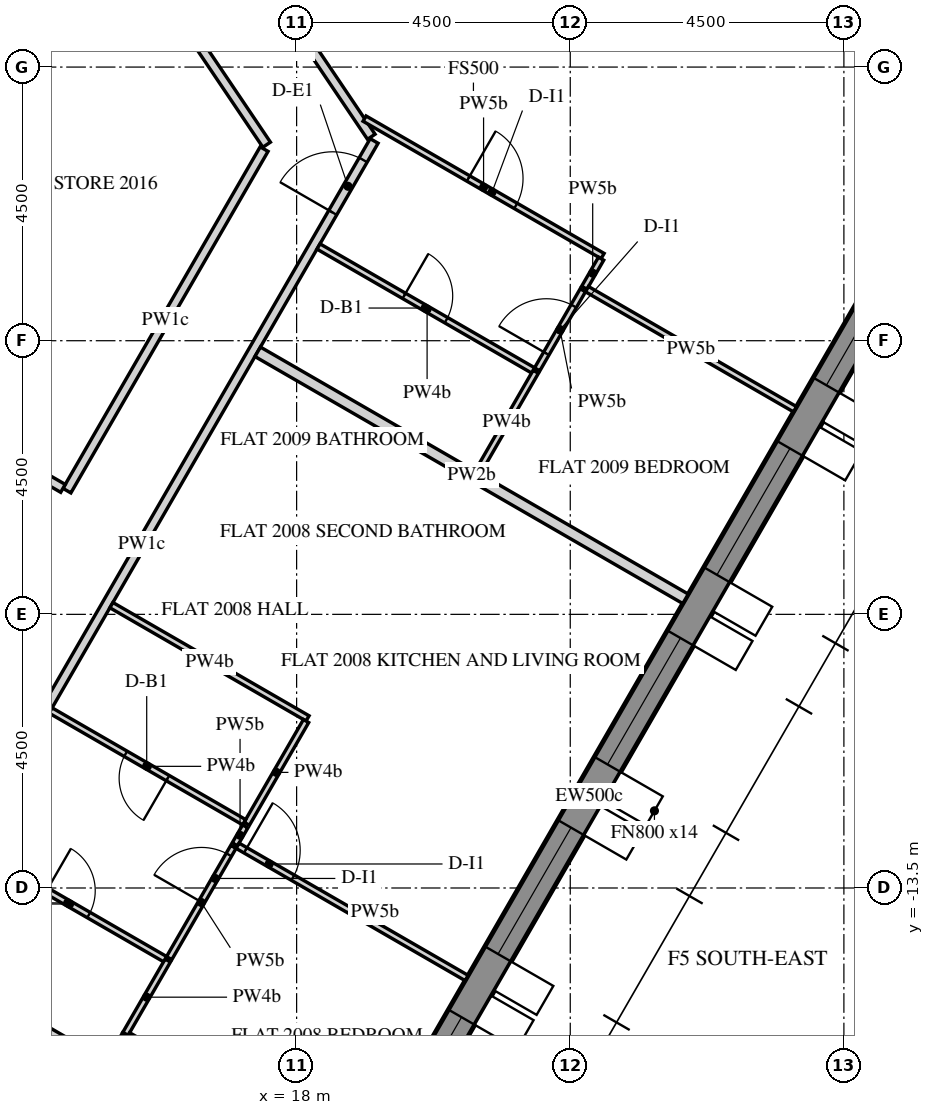
"""IFC4 building model, lengths in metres.
Left out: names, types, materials, properties, quantities, classifications, styles, units other than length and angle.
Written with IfcOpenShell. Run it as: python <this file> out.ifc"""

import sys

from ifc_helpers import new_model, si_unit, direction, frame, frame_2d, origin, place, context, subcontext, project, spatial, polyline, rectangle, outline, extrude, element, fill, save


model = new_model("IFC4")
c1 = context("Model", 3, precision=1e-05, world=origin(), true_north=direction((0.0, 1.0)))
c2 = subcontext(c1, "Body", "Model", "MODEL_VIEW")
j1 = project(units=[si_unit("LENGTHUNIT", "METRE"), si_unit("PLANEANGLEUNIT", "RADIAN")], contexts=[c1])
p1 = place(None, origin())
s1 = spatial("IfcSite", under=j1, at=p1, CompositionType="ELEMENT")
p2 = place(p1, origin())
s2 = spatial("IfcBuilding", under=s1, at=p2, CompositionType="ELEMENT")
p3 = place(p2, frame((0.0, 0.0, 256.2)))
s3 = spatial("IfcBuildingStorey", under=s2, at=p3, CompositionType="ELEMENT", Elevation=256.2)
p4 = place(p3, frame((16.451, -23.005, 0.0), z_axis=(0.0, 0.0, 1.0), x_axis=(0.500003737743, 0.866023245787, 0.0)))
e1 = element("IfcWall", 1, at=p4, inside=s3, PredefinedType="SOLIDWALL", context=c2, shape_type="SweptSolid", body=[
    extrude(outline(polyline([(-0.021, -0.25), (25.468, -0.25), (25.421, 0.25), (0.021, 0.25), (-0.021, -0.25)])), origin(), (0.0, 0.0, 1.0), 3.75),
])
p5 = place(p4, frame((2.522, 0.0, 0.6)))
e2 = element("IfcOpeningElement", 2, at=p5, cuts=e1, PredefinedType="OPENING", context=c2, shape_type="SweptSolid", body=[
    extrude(rectangle(XDim=2.4, YDim=2.7, at=frame_2d((1.2, 1.35))), frame((0.0, 0.26, 0.0), z_axis=(0.0, -1.0, 0.0), x_axis=(1.0, 0.0, 0.0)), (0.0, 0.0, 1.0), 0.52),
])
p6 = place(p4, frame((6.122, 0.0, 0.6)))
e3 = element("IfcOpeningElement", 3, at=p6, cuts=e1, PredefinedType="OPENING", context=c2, shape_type="SweptSolid", body=[
    extrude(rectangle(XDim=2.4, YDim=2.7, at=frame_2d((1.2, 1.35))), frame((0.0, 0.26, 0.0), z_axis=(0.0, -1.0, 0.0), x_axis=(1.0, 0.0, 0.0)), (0.0, 0.0, 1.0), 0.52),
])
p7 = place(p4, frame((9.722, 0.0, 0.6)))
e4 = element("IfcOpeningElement", 4, at=p7, cuts=e1, PredefinedType="OPENING", context=c2, shape_type="SweptSolid", body=[
    extrude(rectangle(XDim=2.4, YDim=2.7, at=frame_2d((1.2, 1.35))), frame((0.0, 0.26, 0.0), z_axis=(0.0, -1.0, 0.0), x_axis=(1.0, 0.0, 0.0)), (0.0, 0.0, 1.0), 0.52),
])
p8 = place(p4, frame((13.323, 0.0, 0.6)))
e5 = element("IfcOpeningElement", 5, at=p8, cuts=e1, PredefinedType="OPENING", context=c2, shape_type="SweptSolid", body=[
    extrude(rectangle(XDim=2.4, YDim=2.7, at=frame_2d((1.2, 1.35))), frame((0.0, 0.26, 0.0), z_axis=(0.0, -1.0, 0.0), x_axis=(1.0, 0.0, 0.0)), (0.0, 0.0, 1.0), 0.52),
])
p9 = place(p4, frame((16.922, 0.0, 0.6)))
e6 = element("IfcOpeningElement", 6, at=p9, cuts=e1, PredefinedType="OPENING", context=c2, shape_type="SweptSolid", body=[
    extrude(rectangle(XDim=2.4, YDim=2.7, at=frame_2d((1.2, 1.35))), frame((0.0, 0.26, 0.0), z_axis=(0.0, -1.0, 0.0), x_axis=(1.0, 0.0, 0.0)), (0.0, 0.0, 1.0), 0.52),
])
p10 = place(p4, frame((20.522, 0.0, 0.6)))
e7 = element("IfcOpeningElement", 7, at=p10, cuts=e1, PredefinedType="OPENING", context=c2, shape_type="SweptSolid", body=[
    extrude(rectangle(XDim=2.4, YDim=2.7, at=frame_2d((1.2, 1.35))), frame((0.0, 0.26, 0.0), z_axis=(0.0, -1.0, 0.0), x_axis=(1.0, 0.0, 0.0)), (0.0, 0.0, 1.0), 0.52),
])
p11 = place(p3, frame((6.351, -11.0, 0.0), z_axis=(0.0, 0.0, 1.0), x_axis=(0.499998894578, -0.866026041999, 0.0)))
e8 = element("IfcWall", 8, at=p11, inside=s3, PredefinedType="SHEAR", context=c2, shape_type="SweptSolid", body=[
    extrude(rectangle(XDim=15.544, YDim=0.4, at=frame_2d((7.772, 0.0))), origin(), (0.0, 0.0, 1.0), 3.75),
])
p12 = place(p11, frame((6.872, 0.0, 0.0)))
e9 = element("IfcOpeningElement", 9, at=p12, cuts=e8, PredefinedType="OPENING", context=c2, shape_type="SweptSolid", body=[
    extrude(rectangle(XDim=1.8, YDim=2.4, at=frame_2d((0.9, 1.2))), frame((0.0, 0.21, 0.0), z_axis=(0.0, -1.0, 0.0), x_axis=(1.0, 0.0, 0.0)), (0.0, 0.0, 1.0), 0.42),
])
p13 = place(p3, frame((11.627, -14.462, 0.0), z_axis=(0.0, 0.0, 1.0), x_axis=(0.499994634027, 0.866028501808, 0.0)))
e10 = element("IfcWall", 10, at=p13, inside=s3, PredefinedType="PARTITIONING", context=c2, shape_type="SweptSolid", body=[
    extrude(rectangle(XDim=15.296, YDim=0.15, at=frame_2d((7.648, 0.0))), origin(), (0.0, 0.0, 1.0), 2.823),
])
p14 = place(p13, frame((2.725, 0.0, 0.0)))
e11 = element("IfcOpeningElement", 11, at=p14, cuts=e10, PredefinedType="OPENING", context=c2, shape_type="SweptSolid", body=[
    extrude(rectangle(XDim=1.0, YDim=2.1, at=frame_2d((0.5, 1.05))), frame((0.0, 0.085, 0.0), z_axis=(0.0, -1.0, 0.0), x_axis=(1.0, 0.0, 0.0)), (0.0, 0.0, 1.0), 0.17),
])
p15 = place(p13, frame((13.936, 0.0, 0.0)))
e12 = element("IfcOpeningElement", 12, at=p15, cuts=e10, PredefinedType="OPENING", context=c2, shape_type="SweptSolid", body=[
    extrude(rectangle(XDim=1.0, YDim=2.1, at=frame_2d((0.5, 1.05))), frame((0.0, 0.085, 0.0), z_axis=(0.0, -1.0, 0.0), x_axis=(1.0, 0.0, 0.0)), (0.0, 0.0, 1.0), 0.17),
])
p16 = place(p3, frame((14.88, -16.427, 0.0), z_axis=(0.0, 0.0, 1.0), x_axis=(-0.86601654697, 0.500015340139, 0.0)))
e13 = element("IfcWall", 13, at=p16, inside=s3, PredefinedType="PARTITIONING", context=c2, shape_type="SweptSolid", body=[
    extrude(rectangle(XDim=3.8, YDim=0.15, at=frame_2d((1.9, 0.0))), origin(), (0.0, 0.0, 1.0), 2.823),
])
p17 = place(p3, frame((19.228, -1.146, 0.0), z_axis=(0.0, 0.0, 1.0), x_axis=(-0.559190017735, 0.829039519001, 0.0)))
e14 = element("IfcWall", 14, at=p17, inside=s3, PredefinedType="PARTITIONING", context=c2, shape_type="SweptSolid", body=[
    extrude(rectangle(XDim=17.273, YDim=0.15, at=frame_2d((8.637, 0.0))), origin(), (0.0, 0.0, 1.0), 2.823),
])
p18 = place(p17, frame((6.478, 0.0, 0.0)))
e15 = element("IfcOpeningElement", 15, at=p18, cuts=e14, PredefinedType="OPENING", context=c2, shape_type="SweptSolid", body=[
    extrude(rectangle(XDim=1.0, YDim=2.1, at=frame_2d((0.5, 1.05))), frame((0.0, 0.085, 0.0), z_axis=(0.0, -1.0, 0.0), x_axis=(1.0, 0.0, 0.0)), (0.0, 0.0, 1.0), 0.17),
])
p19 = place(p3, frame((12.627, 5.958, 0.0), z_axis=(0.0, 0.0, 1.0), x_axis=(0.559185493191, -0.829042570804, 0.0)))
e16 = element("IfcWall", 16, at=p19, inside=s3, PredefinedType="PARTITIONING", context=c2, shape_type="SweptSolid", body=[
    extrude(rectangle(XDim=8.727, YDim=0.15, at=frame_2d((4.363, 0.0))), origin(), (0.0, 0.0, 1.0), 2.823),
])
p20 = place(p19, frame((3.913, 0.0, 0.0)))
e17 = element("IfcOpeningElement", 17, at=p20, cuts=e16, PredefinedType="OPENING", context=c2, shape_type="SweptSolid", body=[
    extrude(rectangle(XDim=0.9, YDim=2.1, at=frame_2d((0.45, 1.05))), frame((0.0, 0.085, 0.0), z_axis=(0.0, -1.0, 0.0), x_axis=(1.0, 0.0, 0.0)), (0.0, 0.0, 1.0), 0.17),
])
p21 = place(p3, frame((17.465, -1.349, 0.0), z_axis=(0.0, 0.0, 1.0), x_axis=(-0.500001610943, -0.866024473704, 0.0)))
e18 = element("IfcWall", 18, at=p21, inside=s3, PredefinedType="PARTITIONING", context=c2, shape_type="SweptSolid", body=[
    extrude(rectangle(XDim=6.485, YDim=0.15, at=frame_2d((3.243, 0.0))), origin(), (0.0, 0.0, 1.0), 2.823),
])
p22 = place(p3, frame((14.158, -6.928, 0.0), z_axis=(0.0, 0.0, 1.0), x_axis=(-0.866024684746, 0.500001245408, 0.0)))
e19 = element("IfcWall", 19, at=p22, inside=s3, PredefinedType="PARTITIONING", context=c2, shape_type="SweptSolid", body=[
    extrude(rectangle(XDim=4.725, YDim=0.15, at=frame_2d((2.363, 0.0))), origin(), (0.0, 0.0, 1.0), 2.823),
])
p23 = place(p3, frame((17.155, -12.487, 0.0), z_axis=(0.0, 0.0, 1.0), x_axis=(-0.499681137129, -0.866209421097, 0.0)))
e20 = element("IfcWall", 20, at=p23, inside=s3, PredefinedType="PARTITIONING", context=c2, shape_type="SweptSolid", body=[
    extrude(rectangle(XDim=0.341, YDim=0.1, at=frame_2d((0.17, 0.0))), origin(), (0.0, 0.0, 1.0), 2.823),
])
p24 = place(p3, frame((17.029, -12.805, 0.0), z_axis=(0.0, 0.0, 1.0), x_axis=(0.866027639635, -0.499996127374, 0.0)))
e21 = element("IfcWall", 21, at=p24, inside=s3, PredefinedType="PARTITIONING", context=c2, shape_type="SweptSolid", body=[
    extrude(rectangle(XDim=4.35, YDim=0.1, at=frame_2d((2.175, 0.0))), origin(), (0.0, 0.0, 1.0), 2.823),
])
p25 = place(p24, frame((0.15, 0.0, 0.0)))
e22 = element("IfcOpeningElement", 22, at=p25, cuts=e21, PredefinedType="OPENING", context=c2, shape_type="SweptSolid", body=[
    extrude(rectangle(XDim=0.9, YDim=2.1, at=frame_2d((0.45, 1.05))), frame((0.0, 0.06, 0.0), z_axis=(0.0, -1.0, 0.0), x_axis=(1.0, 0.0, 0.0)), (0.0, 0.0, 1.0), 0.12),
])
p26 = place(p3, frame((14.954, -8.849, 0.0), z_axis=(0.0, 0.0, 1.0), x_axis=(0.866028424924, -0.499994767197, 0.0)))
e23 = element("IfcWall", 23, at=p26, inside=s3, PredefinedType="PARTITIONING", context=c2, shape_type="SweptSolid", body=[
    extrude(rectangle(XDim=3.725, YDim=0.1, at=frame_2d((1.863, 0.0))), origin(), (0.0, 0.0, 1.0), 2.823),
])
p27 = place(p3, frame((18.155, -10.754, 0.0), z_axis=(0.0, 0.0, 1.0), x_axis=(-0.49989585183, -0.866085525409, 0.0)))
e24 = element("IfcWall", 24, at=p27, inside=s3, PredefinedType="PARTITIONING", context=c2, shape_type="SweptSolid", body=[
    extrude(rectangle(XDim=1.95, YDim=0.1, at=frame_2d((0.975, 0.0))), origin(), (0.0, 0.0, 1.0), 2.823),
])
p28 = place(p3, frame((24.396, -8.745, 0.0), z_axis=(0.0, 0.0, 1.0), x_axis=(-0.866022959057, 0.500004234368, 0.0)))
e25 = element("IfcWall", 25, at=p28, inside=s3, PredefinedType="PARTITIONING", context=c2, shape_type="SweptSolid", body=[
    extrude(rectangle(XDim=8.125, YDim=0.18, at=frame_2d((4.062, 0.0))), origin(), (0.0, 0.0, 1.0), 2.823),
])
p29 = place(p3, frame((12.654, -12.833, 0.0), z_axis=(0.0, 0.0, 1.0), x_axis=(0.866056803351, -0.499945610411, 0.0)))
e26 = element("IfcWall", 26, at=p29, inside=s3, PredefinedType="PARTITIONING", context=c2, shape_type="SweptSolid", body=[
    extrude(rectangle(XDim=3.725, YDim=0.1, at=frame_2d((1.863, 0.0))), origin(), (0.0, 0.0, 1.0), 2.823),
])
p30 = place(p29, frame((1.425, 0.0, 0.0)))
e27 = element("IfcOpeningElement", 27, at=p30, cuts=e26, PredefinedType="OPENING", context=c2, shape_type="SweptSolid", body=[
    extrude(rectangle(XDim=0.8, YDim=2.1, at=frame_2d((0.4, 1.05))), frame((0.0, 0.06, 0.0), z_axis=(0.0, -1.0, 0.0), x_axis=(1.0, 0.0, 0.0)), (0.0, 0.0, 1.0), 0.12),
])
p31 = place(p3, frame((15.904, -14.653, 0.0), z_axis=(0.0, 0.0, 1.0), x_axis=(0.499979177903, 0.866037425094, 0.0)))
e28 = element("IfcWall", 28, at=p31, inside=s3, PredefinedType="PARTITIONING", context=c2, shape_type="SweptSolid", body=[
    extrude(rectangle(XDim=2.113, YDim=0.1, at=frame_2d((1.056, 0.0))), origin(), (0.0, 0.0, 1.0), 2.823),
])
p32 = place(p31, frame((1.063, 0.0, 0.0)))
e29 = element("IfcOpeningElement", 29, at=p32, cuts=e28, PredefinedType="OPENING", context=c2, shape_type="SweptSolid", body=[
    extrude(rectangle(XDim=0.9, YDim=2.1, at=frame_2d((0.45, 1.05))), frame((0.0, 0.06, 0.0), z_axis=(0.0, -1.0, 0.0), x_axis=(1.0, 0.0, 0.0)), (0.0, 0.0, 1.0), 0.12),
])
p33 = place(p3, frame((17.137, -12.418, 0.0), z_axis=(0.0, 0.0, 1.0), x_axis=(-0.866035129944, 0.499983153418, 0.0)))
e30 = element("IfcWall", 30, at=p33, inside=s3, PredefinedType="PARTITIONING", context=c2, shape_type="SweptSolid", body=[
    extrude(rectangle(XDim=3.675, YDim=0.1, at=frame_2d((1.837, 0.0))), origin(), (0.0, 0.0, 1.0), 2.823),
])
p34 = place(p33, frame((1.45, 0.0, 0.0)))
e31 = element("IfcOpeningElement", 31, at=p34, cuts=e30, PredefinedType="OPENING", context=c2, shape_type="SweptSolid", body=[
    extrude(rectangle(XDim=0.8, YDim=2.1, at=frame_2d((0.4, 1.05))), frame((0.0, 0.06, 0.0), z_axis=(0.0, -1.0, 0.0), x_axis=(1.0, 0.0, 0.0)), (0.0, 0.0, 1.0), 0.12),
])
p35 = place(p3, frame((14.917, -16.364, 0.0), z_axis=(0.0, 0.0, 1.0), x_axis=(0.500141487433, 0.865943700565, 0.0)))
e32 = element("IfcWall", 32, at=p35, inside=s3, PredefinedType="PARTITIONING", context=c2, shape_type="SweptSolid", body=[
    extrude(rectangle(XDim=0.538, YDim=0.1, at=frame_2d((0.269, 0.0))), origin(), (0.0, 0.0, 1.0), 2.823),
])
p36 = place(p3, frame((15.186, -15.898, 0.0), z_axis=(0.0, 0.0, 1.0), x_axis=(0.4999705729, 0.866042392862, 0.0)))
e33 = element("IfcWall", 33, at=p36, inside=s3, PredefinedType="PARTITIONING", context=c2, shape_type="SweptSolid", body=[
    extrude(rectangle(XDim=1.391, YDim=0.1, at=frame_2d((0.696, 0.0))), origin(), (0.0, 0.0, 1.0), 2.823),
])
p37 = place(p3, frame((18.996, -18.098, 0.0), z_axis=(0.0, 0.0, 1.0), x_axis=(-0.866027639635, 0.499996127374, 0.0)))
e34 = element("IfcWall", 34, at=p37, inside=s3, PredefinedType="PARTITIONING", context=c2, shape_type="SweptSolid", body=[
    extrude(rectangle(XDim=4.35, YDim=0.1, at=frame_2d((2.175, 0.0))), origin(), (0.0, 0.0, 1.0), 2.823),
])
p38 = place(p37, frame((3.3, 0.0, 0.0)))
e35 = element("IfcOpeningElement", 35, at=p38, cuts=e34, PredefinedType="OPENING", context=c2, shape_type="SweptSolid", body=[
    extrude(rectangle(XDim=0.9, YDim=2.1, at=frame_2d((0.45, 1.05))), frame((0.0, 0.06, 0.0), z_axis=(0.0, -1.0, 0.0), x_axis=(1.0, 0.0, 0.0)), (0.0, 0.0, 1.0), 0.12),
])
p39 = place(p3, frame((19.117, -0.847, 0.0), z_axis=(0.0, 0.0, 1.0), x_axis=(0.866020997002, -0.500007632694, 0.0)))
e36 = element("IfcWall", 36, at=p39, inside=s3, PredefinedType="PARTITIONING", context=c2, shape_type="SweptSolid", body=[
    extrude(rectangle(XDim=4.521, YDim=0.1, at=frame_2d((2.26, 0.0))), origin(), (0.0, 0.0, 1.0), 2.823),
])
p40 = place(p39, frame((1.97, 0.0, 0.0)))
e37 = element("IfcOpeningElement", 37, at=p40, cuts=e36, PredefinedType="OPENING", context=c2, shape_type="SweptSolid", body=[
    extrude(rectangle(XDim=0.9, YDim=2.1, at=frame_2d((0.45, 1.05))), frame((0.0, 0.06, 0.0), z_axis=(0.0, -1.0, 0.0), x_axis=(1.0, 0.0, 0.0)), (0.0, 0.0, 1.0), 0.12),
])
p41 = place(p3, frame((23.007, -3.151, 0.0), z_axis=(0.0, 0.0, 1.0), x_axis=(-0.499850094852, -0.866111934265, 0.0)))
e38 = element("IfcWall", 38, at=p41, inside=s3, PredefinedType="PARTITIONING", context=c2, shape_type="SweptSolid", body=[
    extrude(rectangle(XDim=0.552, YDim=0.1, at=frame_2d((0.276, 0.0))), origin(), (0.0, 0.0, 1.0), 2.823),
])
p42 = place(p3, frame((22.775, -3.652, 0.0), z_axis=(0.0, 0.0, 1.0), x_axis=(0.866020906874, -0.500007788796, 0.0)))
e39 = element("IfcWall", 39, at=p42, inside=s3, PredefinedType="PARTITIONING", context=c2, shape_type="SweptSolid", body=[
    extrude(rectangle(XDim=3.95, YDim=0.1, at=frame_2d((1.975, 0.0))), origin(), (0.0, 0.0, 1.0), 2.823),
])
p43 = place(p3, frame((18.36, -2.95, 0.0), z_axis=(0.0, 0.0, 1.0), x_axis=(0.866019999656, -0.500009360108, 0.0)))
e40 = element("IfcWall", 40, at=p43, inside=s3, PredefinedType="PARTITIONING", context=c2, shape_type="SweptSolid", body=[
    extrude(rectangle(XDim=4.125, YDim=0.1, at=frame_2d((2.062, 0.0))), origin(), (0.0, 0.0, 1.0), 2.823),
])
p44 = place(p43, frame((1.625, 0.0, 0.0)))
e41 = element("IfcOpeningElement", 41, at=p44, cuts=e40, PredefinedType="OPENING", context=c2, shape_type="SweptSolid", body=[
    extrude(rectangle(XDim=0.8, YDim=2.1, at=frame_2d((0.4, 1.05))), frame((0.0, 0.06, 0.0), z_axis=(0.0, -1.0, 0.0), x_axis=(1.0, 0.0, 0.0)), (0.0, 0.0, 1.0), 0.12),
])
p45 = place(p3, frame((21.956, -4.971, 0.0), z_axis=(0.0, 0.0, 1.0), x_axis=(0.499985098601, 0.86603400694, 0.0)))
e42 = element("IfcWall", 42, at=p45, inside=s3, PredefinedType="PARTITIONING", context=c2, shape_type="SweptSolid", body=[
    extrude(rectangle(XDim=1.502, YDim=0.1, at=frame_2d((0.751, 0.0))), origin(), (0.0, 0.0, 1.0), 2.823),
])
p46 = place(p45, frame((0.302, 0.0, 0.0)))
e43 = element("IfcOpeningElement", 43, at=p46, cuts=e42, PredefinedType="OPENING", context=c2, shape_type="SweptSolid", body=[
    extrude(rectangle(XDim=0.9, YDim=2.1, at=frame_2d((0.45, 1.05))), frame((0.0, 0.06, 0.0), z_axis=(0.0, -1.0, 0.0), x_axis=(1.0, 0.0, 0.0)), (0.0, 0.0, 1.0), 0.12),
])
p47 = place(p3, frame((20.977, -6.667, 0.0), z_axis=(0.0, 0.0, 1.0), x_axis=(0.49994353734, 0.866058000062, 0.0)))
e44 = element("IfcWall", 44, at=p47, inside=s3, PredefinedType="PARTITIONING", context=c2, shape_type="SweptSolid", body=[
    extrude(rectangle(XDim=1.912, YDim=0.1, at=frame_2d((0.956, 0.0))), origin(), (0.0, 0.0, 1.0), 2.823),
])
p48 = place(p6, frame((0.0, 0.18, 0.0)))
e45 = element("IfcWindow", 45, at=p48, inside=s3, PartitioningType="DOUBLE_PANEL_VERTICAL", PredefinedType="WINDOW", context=c2, shape_type="SweptSolid", body=[
    extrude(rectangle(XDim=2.4, YDim=2.7, at=frame_2d((1.2, 1.35))), frame((0.0, 0.03, 0.0), z_axis=(0.0, -1.0, 0.0), x_axis=(1.0, 0.0, 0.0)), (0.0, 0.0, 1.0), 0.06),
])
fill(e3, e45)
p49 = place(p7, frame((0.0, 0.18, 0.0)))
e46 = element("IfcWindow", 46, at=p49, inside=s3, PartitioningType="DOUBLE_PANEL_VERTICAL", PredefinedType="WINDOW", context=c2, shape_type="SweptSolid", body=[
    extrude(rectangle(XDim=2.4, YDim=2.7, at=frame_2d((1.2, 1.35))), frame((0.0, 0.03, 0.0), z_axis=(0.0, -1.0, 0.0), x_axis=(1.0, 0.0, 0.0)), (0.0, 0.0, 1.0), 0.06),
])
fill(e4, e46)
p50 = place(p8, frame((0.0, 0.18, 0.0)))
e47 = element("IfcWindow", 47, at=p50, inside=s3, PartitioningType="DOUBLE_PANEL_VERTICAL", PredefinedType="WINDOW", context=c2, shape_type="SweptSolid", body=[
    extrude(rectangle(XDim=2.4, YDim=2.7, at=frame_2d((1.2, 1.35))), frame((0.0, 0.03, 0.0), z_axis=(0.0, -1.0, 0.0), x_axis=(1.0, 0.0, 0.0)), (0.0, 0.0, 1.0), 0.06),
])
fill(e5, e47)
p51 = place(p9, frame((0.0, 0.18, 0.0)))
e48 = element("IfcWindow", 48, at=p51, inside=s3, PartitioningType="DOUBLE_PANEL_VERTICAL", PredefinedType="WINDOW", context=c2, shape_type="SweptSolid", body=[
    extrude(rectangle(XDim=2.4, YDim=2.7, at=frame_2d((1.2, 1.35))), frame((0.0, 0.03, 0.0), z_axis=(0.0, -1.0, 0.0), x_axis=(1.0, 0.0, 0.0)), (0.0, 0.0, 1.0), 0.06),
])
fill(e6, e48)
p52 = place(p10, frame((0.0, 0.18, 0.0)))
e49 = element("IfcWindow", 49, at=p52, inside=s3, PartitioningType="DOUBLE_PANEL_VERTICAL", PredefinedType="WINDOW", context=c2, shape_type="SweptSolid", body=[
    extrude(rectangle(XDim=2.4, YDim=2.7, at=frame_2d((1.2, 1.35))), frame((0.0, 0.03, 0.0), z_axis=(0.0, -1.0, 0.0), x_axis=(1.0, 0.0, 0.0)), (0.0, 0.0, 1.0), 0.06),
])
fill(e7, e49)
p53 = place(p30, origin())
e50 = element("IfcDoor", 50, at=p53, inside=s3, OperationType="SINGLE_SWING_RIGHT", PredefinedType="DOOR", context=c2, shape_type="SweptSolid", body=[
    extrude(rectangle(XDim=0.8, YDim=2.1, at=frame_2d((0.4, 1.05))), frame((0.0, 0.025, 0.0), z_axis=(0.0, -1.0, 0.0), x_axis=(1.0, 0.0, 0.0)), (0.0, 0.0, 1.0), 0.05),
])
fill(e27, e50)
p54 = place(p32, origin())
e51 = element("IfcDoor", 51, at=p54, inside=s3, OperationType="SINGLE_SWING_RIGHT", PredefinedType="DOOR", context=c2, shape_type="SweptSolid", body=[
    extrude(rectangle(XDim=0.9, YDim=2.1, at=frame_2d((0.45, 1.05))), frame((0.0, 0.025, 0.0), z_axis=(0.0, -1.0, 0.0), x_axis=(1.0, 0.0, 0.0)), (0.0, 0.0, 1.0), 0.05),
])
fill(e29, e51)
p55 = place(p25, origin())
e52 = element("IfcDoor", 52, at=p55, inside=s3, OperationType="SINGLE_SWING_RIGHT", PredefinedType="DOOR", context=c2, shape_type="SweptSolid", body=[
    extrude(rectangle(XDim=0.9, YDim=2.1, at=frame_2d((0.45, 1.05))), frame((0.0, 0.025, 0.0), z_axis=(0.0, -1.0, 0.0), x_axis=(1.0, 0.0, 0.0)), (0.0, 0.0, 1.0), 0.05),
])
fill(e22, e52)
p56 = place(p34, origin())
e53 = element("IfcDoor", 53, at=p56, inside=s3, OperationType="SINGLE_SWING_RIGHT", PredefinedType="DOOR", context=c2, shape_type="SweptSolid", body=[
    extrude(rectangle(XDim=0.8, YDim=2.1, at=frame_2d((0.4, 1.05))), frame((0.0, 0.025, 0.0), z_axis=(0.0, -1.0, 0.0), x_axis=(1.0, 0.0, 0.0)), (0.0, 0.0, 1.0), 0.05),
])
fill(e31, e53)
p57 = place(p15, origin())
e54 = element("IfcDoor", 54, at=p57, inside=s3, OperationType="SINGLE_SWING_LEFT", PredefinedType="DOOR", context=c2, shape_type="SweptSolid", body=[
    extrude(rectangle(XDim=1.0, YDim=2.1, at=frame_2d((0.5, 1.05))), frame((0.0, 0.025, 0.0), z_axis=(0.0, -1.0, 0.0), x_axis=(1.0, 0.0, 0.0)), (0.0, 0.0, 1.0), 0.05),
])
fill(e12, e54)
p58 = place(p44, origin())
e55 = element("IfcDoor", 55, at=p58, inside=s3, OperationType="SINGLE_SWING_RIGHT", PredefinedType="DOOR", context=c2, shape_type="SweptSolid", body=[
    extrude(rectangle(XDim=0.8, YDim=2.1, at=frame_2d((0.4, 1.05))), frame((0.0, 0.025, 0.0), z_axis=(0.0, -1.0, 0.0), x_axis=(1.0, 0.0, 0.0)), (0.0, 0.0, 1.0), 0.05),
])
fill(e41, e55)
p59 = place(p40, origin())
e56 = element("IfcDoor", 56, at=p59, inside=s3, OperationType="SINGLE_SWING_LEFT", PredefinedType="DOOR", context=c2, shape_type="SweptSolid", body=[
    extrude(rectangle(XDim=0.9, YDim=2.1, at=frame_2d((0.45, 1.05))), frame((0.0, 0.025, 0.0), z_axis=(0.0, -1.0, 0.0), x_axis=(1.0, 0.0, 0.0)), (0.0, 0.0, 1.0), 0.05),
])
fill(e37, e56)
p60 = place(p46, origin())
e57 = element("IfcDoor", 57, at=p60, inside=s3, OperationType="SINGLE_SWING_RIGHT", PredefinedType="DOOR", context=c2, shape_type="SweptSolid", body=[
    extrude(rectangle(XDim=0.9, YDim=2.1, at=frame_2d((0.45, 1.05))), frame((0.0, 0.025, 0.0), z_axis=(0.0, -1.0, 0.0), x_axis=(1.0, 0.0, 0.0)), (0.0, 0.0, 1.0), 0.05),
])
fill(e43, e57)
save(model, sys.argv[1])
